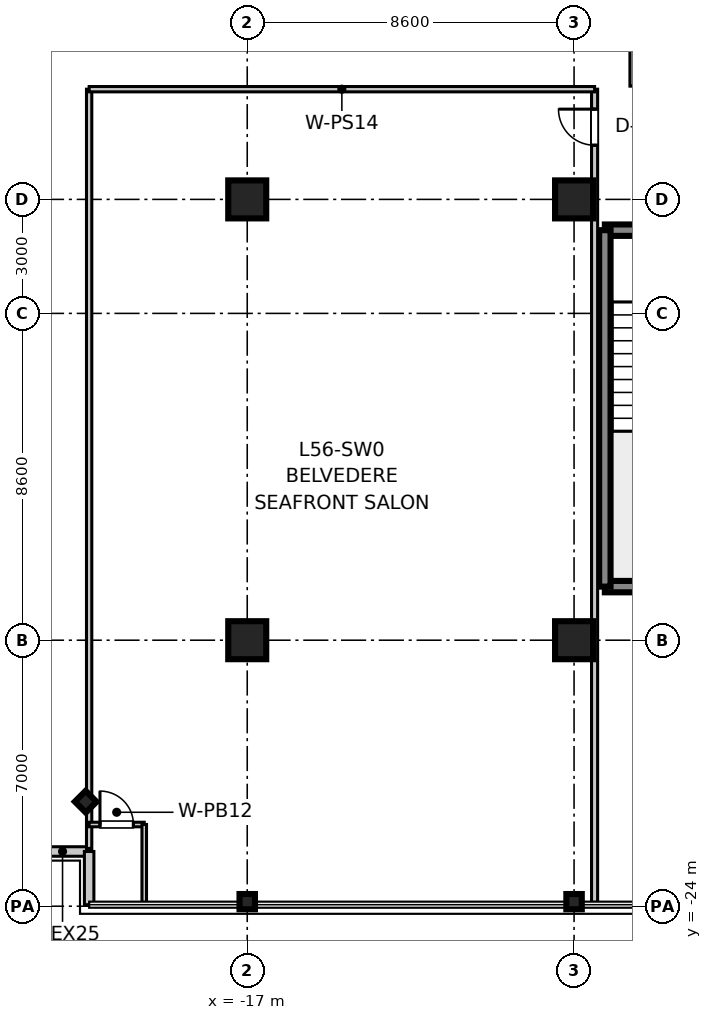
"""IFC4 building model, lengths in metres.
Left out: names, types, materials, properties, quantities, classifications, styles, units other than length and angle.
Written with IfcOpenShell. Run it as: python <this file> out.ifc"""

import sys

from ifc_helpers import new_model, si_unit, direction, frame, frame_2d, origin, origin_2d, place, context, subcontext, project, spatial, rectangle, i_section, extrude, source, transform, mapped, element, fill, save


model = new_model("IFC4")
c1 = context("Model", 3, precision=1e-05, world=origin(), true_north=direction((0.0, 1.0)))
c2 = subcontext(c1, "Body", "Model", "MODEL_VIEW")
j1 = project(units=[si_unit("LENGTHUNIT", "METRE"), si_unit("PLANEANGLEUNIT", "RADIAN")], contexts=[c1])
p1 = place(None, origin())
s1 = spatial("IfcSite", under=j1, at=p1, CompositionType="ELEMENT")
p2 = place(p1, origin())
s2 = spatial("IfcBuilding", under=s1, at=p2, CompositionType="ELEMENT")
p3 = place(p2, frame((0.0, 0.0, 219.7)))
s3 = spatial("IfcBuildingStorey", under=s2, at=p3, CompositionType="ELEMENT", Elevation=219.7)
m1 = source(origin(), c2, "Body", "SweptSolid", [
    extrude(rectangle(XDim=1.0, YDim=1.0, at=origin_2d()), origin(), (0.0, 0.0, 1.0), 3.655),
])
for number, where, z_axis, x_axis in (
    (1, (-17.0, -17.0, 0.0), (0.0, 0.0, 1.0), (1.0, 0.0, 0.0)),
    (2, (-17.0, -5.4, 0.0), (0.0, 0.0, 1.0), (1.0, 0.0, 0.0)),
    (3, (-8.4, -17.0, 0.0), (0.0, 0.0, 1.0), (1.0, 0.0, 0.0)),
    (4, (-8.4, -5.4, 0.0), (0.0, 0.0, 1.0), (1.0, 0.0, 0.0)),
):
    element("IfcColumn", number, at=place(p3, frame(where, z_axis=z_axis, x_axis=x_axis)), inside=s3, PredefinedType="COLUMN", context=c2, shape_type="MappedRepresentation", body=[
        mapped(m1, transform((0.0, 0.0, 0.0), scale=1.0)),
    ])
m2 = source(origin(), c2, "Body", "SweptSolid", [
    extrude(i_section(OverallWidth=0.401, OverallDepth=0.406, WebThickness=0.016, FlangeThickness=0.025, at=origin_2d()), origin(), (0.0, 0.0, 1.0), 3.655),
])
for number, where, z_axis, x_axis in (
    (5, (-17.0, -23.88, 0.0), (0.0, 0.0, 1.0), (0.0, 1.0, 0.0)),
    (6, (-8.4, -23.88, 0.0), (0.0, 0.0, 1.0), (0.0, 1.0, 0.0)),
    (7, (-21.25, -21.25, 0.0), (0.0, 0.0, 1.0), (0.707, 0.707, 0.0)),
):
    element("IfcColumn", number, at=place(p3, frame(where, z_axis=z_axis, x_axis=x_axis)), inside=s3, PredefinedType="COLUMN", context=c2, shape_type="MappedRepresentation", body=[
        mapped(m2, transform((0.0, 0.0, 0.0), scale=1.0)),
    ])
m3 = source(origin(), c2, "Body", "SweptSolid", [
    extrude(rectangle(XDim=3.98, YDim=0.3, at=frame_2d((1.99, 0.0))), origin(), (0.0, 0.0, 1.0), 3.41),
])
p4 = place(p3, frame((-7.59, -15.59, 0.0), z_axis=(0.0, 0.0, 1.0), x_axis=(1.0, 0.0, 0.0)))
e8 = element("IfcWall", 8, at=p4, inside=s3, PredefinedType="SHEAR", context=c2, shape_type="MappedRepresentation", body=[
    mapped(m3, transform((0.0, 0.0, 0.0), scale=1.0)),
])
p5 = place(p3, frame((-7.59, -6.21, 0.0), z_axis=(0.0, 0.0, 1.0), x_axis=(1.0, 0.0, 0.0)))
e9 = element("IfcWall", 9, at=p5, inside=s3, PredefinedType="SHEAR", context=c2, shape_type="MappedRepresentation", body=[
    mapped(m3, transform((0.0, 0.0, 0.0), scale=1.0)),
])
p6 = place(p5, frame((1.44, 0.0, 0.0)))
e10 = element("IfcOpeningElement", 10, at=p6, cuts=e9, PredefinedType="OPENING", context=c2, shape_type="SweptSolid", body=[
    extrude(rectangle(XDim=1.1, YDim=2.15, at=frame_2d((0.55, 1.075))), frame((0.0, 0.16, 0.0), z_axis=(0.0, -1.0, 0.0), x_axis=(1.0, 0.0, 0.0)), (0.0, 0.0, 1.0), 0.32),
])
m4 = source(origin(), c2, "Body", "SweptSolid", [
    extrude(rectangle(XDim=9.38, YDim=0.3, at=frame_2d((4.69, 0.0))), origin(), (0.0, 0.0, 1.0), 3.41),
])
p7 = place(p3, frame((-7.59, -15.59, 0.0), z_axis=(0.0, 0.0, 1.0), x_axis=(0.0, 1.0, 0.0)))
e11 = element("IfcWall", 11, at=p7, inside=s3, PredefinedType="SHEAR", context=c2, shape_type="MappedRepresentation", body=[
    mapped(m4, transform((0.0, 0.0, 0.0), scale=1.0)),
])
m5 = source(origin(), c2, "Body", "SweptSolid", [
    extrude(rectangle(XDim=1.4, YDim=0.25, at=frame_2d((0.7, 0.0))), origin(), (0.0, 0.0, 1.0), 3.41),
])
p8 = place(p3, frame((-22.56, -22.56, 0.0), z_axis=(0.0, 0.0, 1.0), x_axis=(1.0, 0.0, 0.0)))
e12 = element("IfcWall", 12, at=p8, inside=s3, PredefinedType="STANDARD", context=c2, shape_type="MappedRepresentation", body=[
    mapped(m5, transform((0.0, 0.0, 0.0), scale=1.0)),
])
m6 = source(origin(), c2, "Body", "SweptSolid", [
    extrude(rectangle(XDim=1.4, YDim=0.25, at=frame_2d((0.7, 0.0))), origin(), (0.0, 0.0, 1.0), 3.41),
])
p9 = place(p3, frame((-21.16, -23.96, 0.0), z_axis=(0.0, 0.0, 1.0), x_axis=(0.0, 1.0, 0.0)))
e13 = element("IfcWall", 13, at=p9, inside=s3, PredefinedType="STANDARD", context=c2, shape_type="MappedRepresentation", body=[
    mapped(m6, transform((0.0, 0.0, 0.0), scale=1.0)),
])
m7 = source(origin(), c2, "Body", "SweptSolid", [
    extrude(rectangle(XDim=21.4, YDim=0.16, at=frame_2d((10.7, 0.0))), origin(), (0.0, 0.0, 1.0), 2.75),
])
p10 = place(p3, frame((-7.86, -23.9, 0.0), z_axis=(0.0, 0.0, 1.0), x_axis=(0.0, 1.0, 0.0)))
e14 = element("IfcWall", 14, at=p10, inside=s3, PredefinedType="PARTITIONING", context=c2, shape_type="MappedRepresentation", body=[
    mapped(m7, transform((0.0, 0.0, 0.0), scale=1.0)),
])
p11 = place(p10, frame((19.925, 0.0, 0.0)))
e15 = element("IfcOpeningElement", 15, at=p11, cuts=e14, PredefinedType="OPENING", context=c2, shape_type="SweptSolid", body=[
    extrude(rectangle(XDim=0.95, YDim=2.1, at=frame_2d((0.475, 1.05))), frame((0.0, 0.09, 0.0), z_axis=(0.0, -1.0, 0.0), x_axis=(1.0, 0.0, 0.0)), (0.0, 0.0, 1.0), 0.18),
])
m8 = source(origin(), c2, "Body", "SweptSolid", [
    extrude(rectangle(XDim=19.98, YDim=0.14, at=frame_2d((9.99, 0.0))), origin(), (0.0, 0.0, 1.0), 2.75),
])
p12 = place(p3, frame((-21.16, -22.48, 0.0), z_axis=(0.0, 0.0, 1.0), x_axis=(0.0, 1.0, 0.0)))
e16 = element("IfcWall", 16, at=p12, inside=s3, PredefinedType="PARTITIONING", context=c2, shape_type="MappedRepresentation", body=[
    mapped(m8, transform((0.0, 0.0, 0.0), scale=1.0)),
])
m9 = source(origin(), c2, "Body", "SweptSolid", [
    extrude(rectangle(XDim=13.3, YDim=0.14, at=frame_2d((6.65, 0.0))), origin(), (0.0, 0.0, 1.0), 2.75),
])
p13 = place(p3, frame((-21.16, -2.5, 0.0), z_axis=(0.0, 0.0, 1.0), x_axis=(1.0, 0.0, 0.0)))
e17 = element("IfcWall", 17, at=p13, inside=s3, PredefinedType="PARTITIONING", context=c2, shape_type="MappedRepresentation", body=[
    mapped(m9, transform((0.0, 0.0, 0.0), scale=1.0)),
])
m10 = source(origin(), c2, "Body", "SweptSolid", [
    extrude(rectangle(XDim=1.45, YDim=0.12, at=frame_2d((0.725, 0.0))), origin(), (0.0, 0.0, 1.0), 2.75),
])
p14 = place(p3, frame((-21.16, -21.85, 0.0), z_axis=(0.0, 0.0, 1.0), x_axis=(1.0, 0.0, 0.0)))
e18 = element("IfcWall", 18, at=p14, inside=s3, PredefinedType="PARTITIONING", context=c2, shape_type="MappedRepresentation", body=[
    mapped(m10, transform((0.0, 0.0, 0.0), scale=1.0)),
])
p15 = place(p14, frame((0.285, 0.0, 0.0)))
e19 = element("IfcOpeningElement", 19, at=p15, cuts=e18, PredefinedType="OPENING", context=c2, shape_type="SweptSolid", body=[
    extrude(rectangle(XDim=0.88, YDim=2.1, at=frame_2d((0.44, 1.05))), frame((0.0, 0.07, 0.0), z_axis=(0.0, -1.0, 0.0), x_axis=(1.0, 0.0, 0.0)), (0.0, 0.0, 1.0), 0.14),
])
m11 = source(origin(), c2, "Body", "SweptSolid", [
    extrude(rectangle(XDim=2.05, YDim=0.12, at=frame_2d((1.025, 0.0))), origin(), (0.0, 0.0, 1.0), 2.75),
])
p16 = place(p3, frame((-19.71, -23.9, 0.0), z_axis=(0.0, 0.0, 1.0), x_axis=(0.0, 1.0, 0.0)))
e20 = element("IfcWall", 20, at=p16, inside=s3, PredefinedType="PARTITIONING", context=c2, shape_type="MappedRepresentation", body=[
    mapped(m11, transform((0.0, 0.0, 0.0), scale=1.0)),
])
m12 = source(origin(), c2, "Body", "SweptSolid", [
    extrude(rectangle(XDim=4.84, YDim=0.16, at=frame_2d((2.42, 0.0))), origin(), (0.0, 0.0, 1.0), 2.75),
])
p17 = place(p3, frame((-6.85, -2.42, 0.0), z_axis=(0.0, 0.0, 1.0), x_axis=(0.0, 1.0, 0.0)))
e21 = element("IfcWall", 21, at=p17, inside=s3, PredefinedType="PARTITIONING", context=c2, shape_type="MappedRepresentation", body=[
    mapped(m12, transform((0.0, 0.0, 0.0), scale=1.0)),
])
p18 = place(p17, frame((1.945, 0.0, 0.0)))
e22 = element("IfcOpeningElement", 22, at=p18, cuts=e21, PredefinedType="OPENING", context=c2, shape_type="SweptSolid", body=[
    extrude(rectangle(XDim=0.95, YDim=2.1, at=frame_2d((0.475, 1.05))), frame((0.0, 0.09, 0.0), z_axis=(0.0, -1.0, 0.0), x_axis=(1.0, 0.0, 0.0)), (0.0, 0.0, 1.0), 0.18),
])
m13 = source(origin(), c2, "Body", "SweptSolid", [
    extrude(rectangle(XDim=0.88, YDim=2.1, at=frame_2d((0.44, 1.05))), frame((0.0, 0.025, 0.0), z_axis=(0.0, -1.0, 0.0), x_axis=(1.0, 0.0, 0.0)), (0.0, 0.0, 1.0), 0.05),
])
p19 = place(p15, frame((0.88, 0.0, 0.0), z_axis=(0.0, 0.0, 1.0), x_axis=(-1.0, 0.0, 0.0)))
e23 = element("IfcDoor", 23, at=p19, inside=s3, OperationType="SINGLE_SWING_LEFT", PredefinedType="DOOR", context=c2, shape_type="MappedRepresentation", body=[
    mapped(m13, transform((0.0, 0.0, 0.0), scale=1.0)),
])
fill(e19, e23)
m14 = source(origin(), c2, "Body", "SweptSolid", [
    extrude(rectangle(XDim=0.95, YDim=2.1, at=frame_2d((0.475, 1.05))), frame((0.0, 0.025, 0.0), z_axis=(0.0, -1.0, 0.0), x_axis=(1.0, 0.0, 0.0)), (0.0, 0.0, 1.0), 0.05),
])
p20 = place(p11, origin())
e24 = element("IfcDoor", 24, at=p20, inside=s3, OperationType="SINGLE_SWING_RIGHT", PredefinedType="DOOR", context=c2, shape_type="MappedRepresentation", body=[
    mapped(m14, transform((0.0, 0.0, 0.0), scale=1.0)),
])
fill(e15, e24)
save(model, sys.argv[1])
